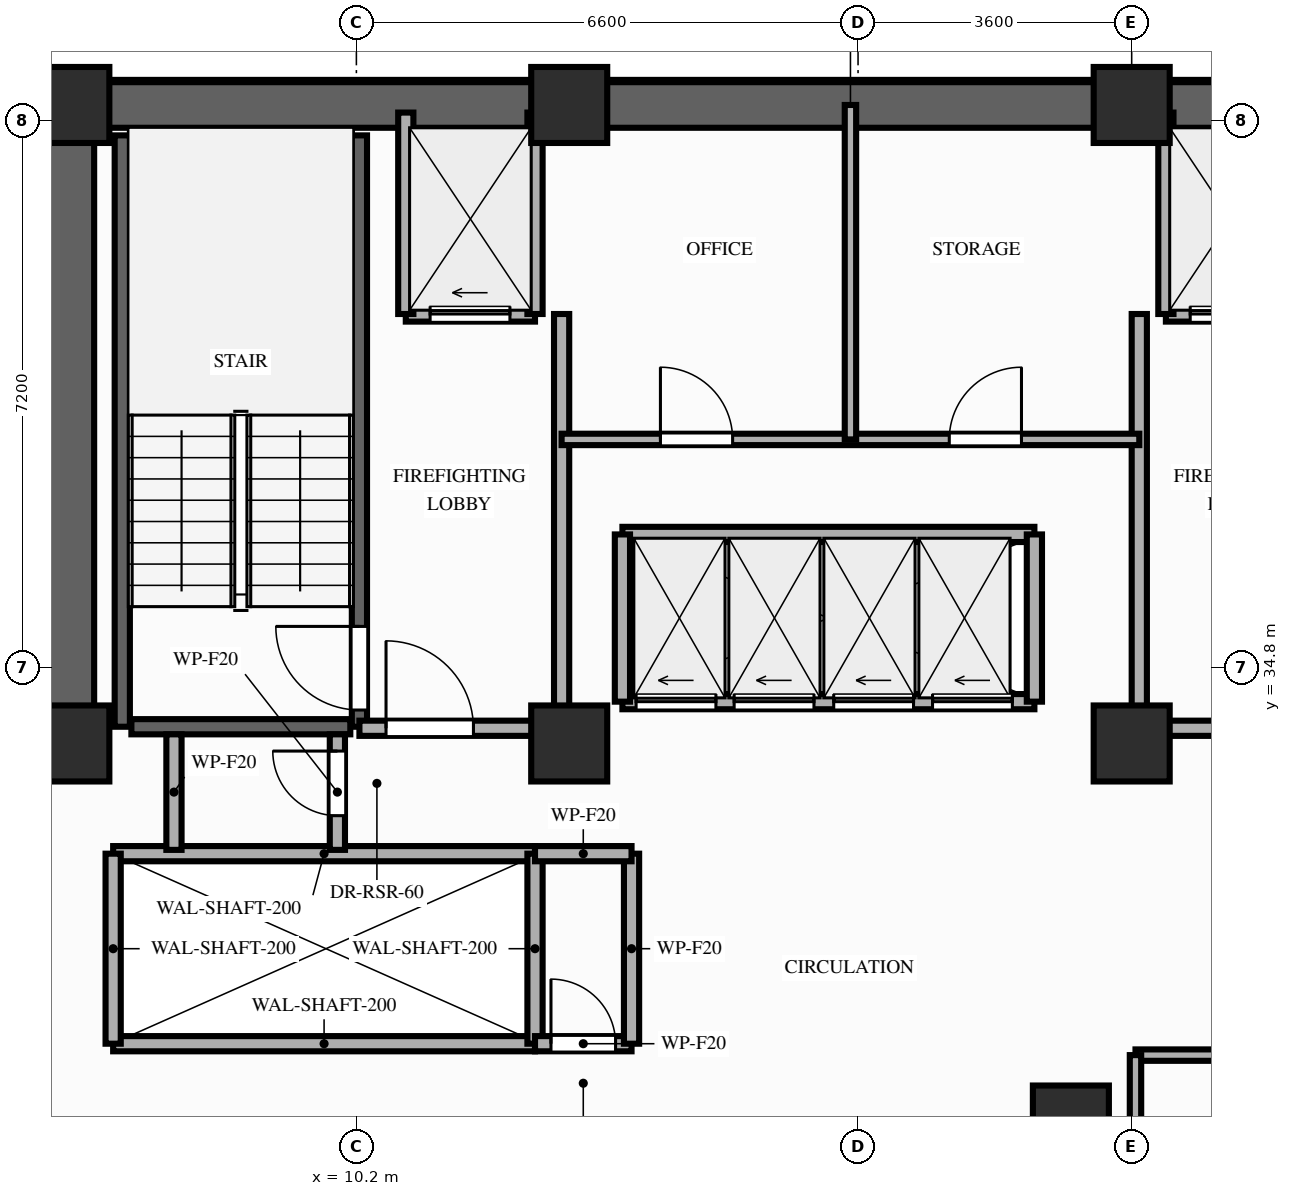
"""IFC4 building model, lengths in metres.
Left out: names, types, materials, properties, quantities, classifications, styles, units other than length and angle.
Written with IfcOpenShell. Run it as: python <this file> out.ifc"""

import sys

from ifc_helpers import new_model, si_unit, direction, frame, frame_2d, origin, origin_2d, place, context, subcontext, project, spatial, rectangle, extrude, element, fill, save


model = new_model("IFC4")
c1 = context("Model", 3, precision=1e-05, world=origin(), true_north=direction((0.0, 1.0)))
c2 = subcontext(c1, "Body", "Model", "MODEL_VIEW")
j1 = project(units=[si_unit("LENGTHUNIT", "METRE"), si_unit("PLANEANGLEUNIT", "RADIAN")], contexts=[c1])
p1 = place(None, origin())
s1 = spatial("IfcSite", under=j1, at=p1, CompositionType="ELEMENT")
p2 = place(p1, origin())
s2 = spatial("IfcBuilding", under=s1, at=p2, CompositionType="ELEMENT")
p3 = place(p2, frame((0.0, 0.0, 120.2)))
s3 = spatial("IfcBuildingStorey", under=s2, at=p3, CompositionType="ELEMENT", Elevation=120.2)
for number, where, z_axis, x_axis in (
    (1, (6.45, 33.8, 0.0), (0.0, 0.0, 1.0), (1.0, 0.0, 0.0)),
    (2, (13.0, 33.8, 0.0), (0.0, 0.0, 1.0), (1.0, 0.0, 0.0)),
    (3, (20.4, 33.8, 0.0), (0.0, 0.0, 1.0), (1.0, 0.0, 0.0)),
    (4, (6.45, 42.2, 0.0), (0.0, 0.0, 1.0), (1.0, 0.0, 0.0)),
    (5, (13.0, 42.2, 0.0), (0.0, 0.0, 1.0), (1.0, 0.0, 0.0)),
    (6, (20.4, 42.2, 0.0), (0.0, 0.0, 1.0), (1.0, 0.0, 0.0)),
    (7, (19.6, 28.8, 0.0), (0.0, 0.0, 1.0), (1.0, 0.0, 0.0)),
):
    element("IfcColumn", number, at=place(p3, frame(where, z_axis=z_axis, x_axis=x_axis)), inside=s3, PredefinedType="COLUMN", context=c2, shape_type="SweptSolid", body=[
        extrude(rectangle(XDim=1.0, YDim=1.0, at=origin_2d()), origin(), (0.0, 0.0, 1.0), 3.2),
    ])
p4 = place(p3, frame((6.45, 42.2, 0.0), z_axis=(0.0, 0.0, 1.0), x_axis=(1.0, 0.0, 0.0)))
e8 = element("IfcWall", 8, at=p4, inside=s3, PredefinedType="SHEAR", context=c2, shape_type="SweptSolid", body=[
    extrude(rectangle(XDim=20.45, YDim=0.6, at=frame_2d((10.225, 0.0))), origin(), (0.0, 0.0, 1.0), 3.02),
])
p5 = place(p3, frame((6.45, 33.8, 0.0), z_axis=(0.0, 0.0, 1.0), x_axis=(0.0, 1.0, 0.0)))
e9 = element("IfcWall", 9, at=p5, inside=s3, PredefinedType="SHEAR", context=c2, shape_type="SweptSolid", body=[
    extrude(rectangle(XDim=7.95, YDim=0.6, at=frame_2d((3.975, 0.0))), origin(), (0.0, 0.0, 1.0), 3.02),
])
p6 = place(p3, frame((7.12, 34.02, 0.0), z_axis=(0.0, 0.0, 1.0), x_axis=(0.0, 1.0, 0.0)))
e10 = element("IfcWall", 10, at=p6, inside=s3, PredefinedType="SHEAR", context=c2, shape_type="SweptSolid", body=[
    extrude(rectangle(XDim=7.78, YDim=0.2, at=frame_2d((3.89, 0.0))), origin(), (0.0, 0.0, 1.0), 3.02),
])
p7 = place(p3, frame((10.24, 34.02, 0.0), z_axis=(0.0, 0.0, 1.0), x_axis=(0.0, 1.0, 0.0)))
e11 = element("IfcWall", 11, at=p7, inside=s3, PredefinedType="SHEAR", context=c2, shape_type="SweptSolid", body=[
    extrude(rectangle(XDim=7.78, YDim=0.2, at=frame_2d((3.89, 0.0))), origin(), (0.0, 0.0, 1.0), 3.02),
])
p8 = place(p7, frame((0.22, 0.0, 0.0)))
e12 = element("IfcOpeningElement", 12, at=p8, cuts=e11, PredefinedType="OPENING", context=c2, shape_type="SweptSolid", body=[
    extrude(rectangle(XDim=1.1, YDim=2.15, at=frame_2d((0.55, 1.075))), frame((0.0, 0.11, 0.0), z_axis=(0.0, -1.0, 0.0), x_axis=(1.0, 0.0, 0.0)), (0.0, 0.0, 1.0), 0.22),
])
p9 = place(p3, frame((7.24, 34.02, 0.0), z_axis=(0.0, 0.0, 1.0), x_axis=(1.0, 0.0, 0.0)))
e13 = element("IfcWall", 13, at=p9, inside=s3, PredefinedType="SHEAR", context=c2, shape_type="SweptSolid", body=[
    extrude(rectangle(XDim=2.88, YDim=0.2, at=frame_2d((1.44, 0.0))), origin(), (0.0, 0.0, 1.0), 3.02),
])
for number, where, z_axis, x_axis in (
    (14, (7.0, 29.85, 0.0), (0.0, 0.0, 1.0), (1.0, 0.0, 0.0)),
    (15, (7.0, 32.35, 0.0), (0.0, 0.0, 1.0), (1.0, 0.0, 0.0)),
):
    element("IfcWall", number, at=place(p3, frame(where, z_axis=z_axis, x_axis=x_axis)), inside=s3, PredefinedType="MOVABLE", context=c2, shape_type="SweptSolid", body=[
        extrude(rectangle(XDim=5.55, YDim=0.2, at=frame_2d((2.775, 0.0))), origin(), (0.0, 0.0, 1.0), 3.02),
    ])
for number, where, z_axis, x_axis in (
    (16, (7.0, 29.85, 0.0), (0.0, 0.0, 1.0), (0.0, 1.0, 0.0)),
    (17, (12.55, 29.85, 0.0), (0.0, 0.0, 1.0), (0.0, 1.0, 0.0)),
):
    element("IfcWall", number, at=place(p3, frame(where, z_axis=z_axis, x_axis=x_axis)), inside=s3, PredefinedType="MOVABLE", context=c2, shape_type="SweptSolid", body=[
        extrude(rectangle(XDim=2.5, YDim=0.2, at=frame_2d((1.25, 0.0))), origin(), (0.0, 0.0, 1.0), 3.02),
    ])
p10 = place(p3, frame((10.85, 39.45, 0.0), z_axis=(0.0, 0.0, 1.0), x_axis=(1.0, 0.0, 0.0)))
e18 = element("IfcWall", 18, at=p10, inside=s3, PredefinedType="MOVABLE", context=c2, shape_type="SweptSolid", body=[
    extrude(rectangle(XDim=1.7, YDim=0.2, at=frame_2d((0.85, 0.0))), origin(), (0.0, 0.0, 1.0), 3.02),
])
p11 = place(p10, frame((0.32, 0.0, 0.0)))
e19 = element("IfcOpeningElement", 19, at=p11, cuts=e18, PredefinedType="OPENING", context=c2, shape_type="SweptSolid", body=[
    extrude(rectangle(XDim=1.05, YDim=2.15, at=frame_2d((0.525, 1.075))), frame((0.0, 0.11, 0.0), z_axis=(0.0, -1.0, 0.0), x_axis=(1.0, 0.0, 0.0)), (0.0, 0.0, 1.0), 0.22),
])
p12 = place(p3, frame((20.85, 39.45, 0.0), z_axis=(0.0, 0.0, 1.0), x_axis=(1.0, 0.0, 0.0)))
e20 = element("IfcWall", 20, at=p12, inside=s3, PredefinedType="MOVABLE", context=c2, shape_type="SweptSolid", body=[
    extrude(rectangle(XDim=1.7, YDim=0.2, at=frame_2d((0.85, 0.0))), origin(), (0.0, 0.0, 1.0), 3.02),
])
p13 = place(p12, frame((0.32, 0.0, 0.0)))
e21 = element("IfcOpeningElement", 21, at=p13, cuts=e20, PredefinedType="OPENING", context=c2, shape_type="SweptSolid", body=[
    extrude(rectangle(XDim=1.05, YDim=2.15, at=frame_2d((0.525, 1.075))), frame((0.0, 0.11, 0.0), z_axis=(0.0, -1.0, 0.0), x_axis=(1.0, 0.0, 0.0)), (0.0, 0.0, 1.0), 0.22),
])
for number, where, z_axis, x_axis in (
    (22, (10.85, 39.45, 0.0), (0.0, 0.0, 1.0), (0.0, 1.0, 0.0)),
    (23, (12.55, 39.45, 0.0), (0.0, 0.0, 1.0), (0.0, 1.0, 0.0)),
):
    element("IfcWall", number, at=place(p3, frame(where, z_axis=z_axis, x_axis=x_axis)), inside=s3, PredefinedType="MOVABLE", context=c2, shape_type="SweptSolid", body=[
        extrude(rectangle(XDim=2.65, YDim=0.2, at=frame_2d((1.325, 0.0))), origin(), (0.0, 0.0, 1.0), 2.41),
    ])
p14 = place(p3, frame((12.9, 34.0, 0.0), z_axis=(0.0, 0.0, 1.0), x_axis=(0.0, 1.0, 0.0)))
e24 = element("IfcWall", 24, at=p14, inside=s3, PredefinedType="PARTITIONING", context=c2, shape_type="SweptSolid", body=[
    extrude(rectangle(XDim=5.45, YDim=0.2, at=frame_2d((2.725, 0.0))), origin(), (0.0, 0.0, 1.0), 2.41),
])
p15 = place(p3, frame((10.24, 34.0, 0.0), z_axis=(0.0, 0.0, 1.0), x_axis=(1.0, 0.0, 0.0)))
e25 = element("IfcWall", 25, at=p15, inside=s3, PredefinedType="PARTITIONING", context=c2, shape_type="SweptSolid", body=[
    extrude(rectangle(XDim=2.66, YDim=0.2, at=frame_2d((1.33, 0.0))), origin(), (0.0, 0.0, 1.0), 2.41),
])
p16 = place(p15, frame((0.35, 0.0, 0.0)))
e26 = element("IfcOpeningElement", 26, at=p16, cuts=e25, PredefinedType="OPENING", context=c2, shape_type="SweptSolid", body=[
    extrude(rectangle(XDim=1.15, YDim=2.15, at=frame_2d((0.575, 1.075))), frame((0.0, 0.11, 0.0), z_axis=(0.0, -1.0, 0.0), x_axis=(1.0, 0.0, 0.0)), (0.0, 0.0, 1.0), 0.22),
])
p17 = place(p3, frame((20.85, 39.45, 0.0), z_axis=(0.0, 0.0, 1.0), x_axis=(0.0, 1.0, 0.0)))
e27 = element("IfcWall", 27, at=p17, inside=s3, PredefinedType="MOVABLE", context=c2, shape_type="SweptSolid", body=[
    extrude(rectangle(XDim=2.65, YDim=0.2, at=frame_2d((1.325, 0.0))), origin(), (0.0, 0.0, 1.0), 2.41),
])
p18 = place(p3, frame((20.5, 34.0, 0.0), z_axis=(0.0, 0.0, 1.0), x_axis=(0.0, 1.0, 0.0)))
e28 = element("IfcWall", 28, at=p18, inside=s3, PredefinedType="PARTITIONING", context=c2, shape_type="SweptSolid", body=[
    extrude(rectangle(XDim=5.45, YDim=0.2, at=frame_2d((2.725, 0.0))), origin(), (0.0, 0.0, 1.0), 2.41),
])
p19 = place(p3, frame((20.5, 34.0, 0.0), z_axis=(0.0, 0.0, 1.0), x_axis=(1.0, 0.0, 0.0)))
e29 = element("IfcWall", 29, at=p19, inside=s3, PredefinedType="PARTITIONING", context=c2, shape_type="SweptSolid", body=[
    extrude(rectangle(XDim=2.6, YDim=0.2, at=frame_2d((1.3, 0.0))), origin(), (0.0, 0.0, 1.0), 2.41),
])
p20 = place(p19, frame((1.05, 0.0, 0.0)))
e30 = element("IfcOpeningElement", 30, at=p20, cuts=e29, PredefinedType="OPENING", context=c2, shape_type="SweptSolid", body=[
    extrude(rectangle(XDim=1.15, YDim=2.15, at=frame_2d((0.575, 1.075))), frame((0.0, 0.11, 0.0), z_axis=(0.0, -1.0, 0.0), x_axis=(1.0, 0.0, 0.0)), (0.0, 0.0, 1.0), 0.22),
])
p21 = place(p3, frame((12.55, 29.85, 0.0), z_axis=(0.0, 0.0, 1.0), x_axis=(1.0, 0.0, 0.0)))
e31 = element("IfcWall", 31, at=p21, inside=s3, PredefinedType="PARTITIONING", context=c2, shape_type="SweptSolid", body=[
    extrude(rectangle(XDim=1.27, YDim=0.2, at=frame_2d((0.635, 0.0))), origin(), (0.0, 0.0, 1.0), 3.02),
])
p22 = place(p21, frame((0.21, 0.0, 0.0)))
e32 = element("IfcOpeningElement", 32, at=p22, cuts=e31, PredefinedType="OPENING", context=c2, shape_type="SweptSolid", body=[
    extrude(rectangle(XDim=0.85, YDim=2.05, at=frame_2d((0.425, 1.025))), frame((0.0, 0.11, 0.0), z_axis=(0.0, -1.0, 0.0), x_axis=(1.0, 0.0, 0.0)), (0.0, 0.0, 1.0), 0.22),
])
p23 = place(p3, frame((13.82, 29.85, 0.0), z_axis=(0.0, 0.0, 1.0), x_axis=(0.0, 1.0, 0.0)))
e33 = element("IfcWall", 33, at=p23, inside=s3, PredefinedType="PARTITIONING", context=c2, shape_type="SweptSolid", body=[
    extrude(rectangle(XDim=2.5, YDim=0.2, at=frame_2d((1.25, 0.0))), origin(), (0.0, 0.0, 1.0), 3.02),
])
p24 = place(p3, frame((12.55, 32.35, 0.0), z_axis=(0.0, 0.0, 1.0), x_axis=(1.0, 0.0, 0.0)))
e34 = element("IfcWall", 34, at=p24, inside=s3, PredefinedType="PARTITIONING", context=c2, shape_type="SweptSolid", body=[
    extrude(rectangle(XDim=1.27, YDim=0.2, at=frame_2d((0.635, 0.0))), origin(), (0.0, 0.0, 1.0), 3.02),
])
p25 = place(p3, frame((7.8, 32.4, 0.0), z_axis=(0.0, 0.0, 1.0), x_axis=(0.0, 1.0, 0.0)))
e35 = element("IfcWall", 35, at=p25, inside=s3, PredefinedType="PARTITIONING", context=c2, shape_type="SweptSolid", body=[
    extrude(rectangle(XDim=1.52, YDim=0.2, at=frame_2d((0.76, 0.0))), origin(), (0.0, 0.0, 1.0), 2.41),
])
p26 = place(p3, frame((9.95, 32.4, 0.0), z_axis=(0.0, 0.0, 1.0), x_axis=(0.0, 1.0, 0.0)))
e36 = element("IfcWall", 36, at=p26, inside=s3, PredefinedType="PARTITIONING", context=c2, shape_type="SweptSolid", body=[
    extrude(rectangle(XDim=1.52, YDim=0.2, at=frame_2d((0.76, 0.0))), origin(), (0.0, 0.0, 1.0), 2.41),
])
p27 = place(p26, frame((0.45, 0.0, 0.0)))
e37 = element("IfcOpeningElement", 37, at=p27, cuts=e36, PredefinedType="OPENING", context=c2, shape_type="SweptSolid", body=[
    extrude(rectangle(XDim=0.85, YDim=2.05, at=frame_2d((0.425, 1.025))), frame((0.0, 0.11, 0.0), z_axis=(0.0, -1.0, 0.0), x_axis=(1.0, 0.0, 0.0)), (0.0, 0.0, 1.0), 0.22),
])
p28 = place(p3, frame((12.9, 37.8, 0.0), z_axis=(0.0, 0.0, 1.0), x_axis=(1.0, 0.0, 0.0)))
e38 = element("IfcWall", 38, at=p28, inside=s3, PredefinedType="PARTITIONING", context=c2, shape_type="SweptSolid", body=[
    extrude(rectangle(XDim=7.6, YDim=0.15, at=frame_2d((3.8, 0.0))), origin(), (0.0, 0.0, 1.0), 3.02),
])
p29 = place(p28, frame((1.3, 0.0, 0.0)))
e39 = element("IfcOpeningElement", 39, at=p29, cuts=e38, PredefinedType="OPENING", context=c2, shape_type="SweptSolid", body=[
    extrude(rectangle(XDim=0.95, YDim=2.15, at=frame_2d((0.475, 1.075))), frame((0.0, 0.085, 0.0), z_axis=(0.0, -1.0, 0.0), x_axis=(1.0, 0.0, 0.0)), (0.0, 0.0, 1.0), 0.17),
])
p30 = place(p28, frame((5.1, 0.0, 0.0)))
e40 = element("IfcOpeningElement", 40, at=p30, cuts=e38, PredefinedType="OPENING", context=c2, shape_type="SweptSolid", body=[
    extrude(rectangle(XDim=0.95, YDim=2.15, at=frame_2d((0.475, 1.075))), frame((0.0, 0.085, 0.0), z_axis=(0.0, -1.0, 0.0), x_axis=(1.0, 0.0, 0.0)), (0.0, 0.0, 1.0), 0.17),
])
p31 = place(p3, frame((16.7, 37.8, 0.0), z_axis=(0.0, 0.0, 1.0), x_axis=(0.0, 1.0, 0.0)))
e41 = element("IfcWall", 41, at=p31, inside=s3, PredefinedType="PARTITIONING", context=c2, shape_type="SweptSolid", body=[
    extrude(rectangle(XDim=4.4, YDim=0.15, at=frame_2d((2.2, 0.0))), origin(), (0.0, 0.0, 1.0), 2.41),
])
p32 = place(p3, frame((13.7, 34.35, 0.0), z_axis=(0.0, 0.0, 1.0), x_axis=(1.0, 0.0, 0.0)))
e42 = element("IfcWall", 42, at=p32, inside=s3, PredefinedType="MOVABLE", context=c2, shape_type="SweptSolid", body=[
    extrude(rectangle(XDim=5.42, YDim=0.2, at=frame_2d((2.71, 0.0))), origin(), (0.0, 0.0, 1.0), 3.02),
])
p33 = place(p32, frame((0.18, 0.0, 0.0)))
e43 = element("IfcOpeningElement", 43, at=p33, cuts=e42, PredefinedType="OPENING", context=c2, shape_type="SweptSolid", body=[
    extrude(rectangle(XDim=1.05, YDim=2.15, at=frame_2d((0.525, 1.075))), frame((0.0, 0.11, 0.0), z_axis=(0.0, -1.0, 0.0), x_axis=(1.0, 0.0, 0.0)), (0.0, 0.0, 1.0), 0.22),
])
p34 = place(p32, frame((1.47, 0.0, 0.0)))
e44 = element("IfcOpeningElement", 44, at=p34, cuts=e42, PredefinedType="OPENING", context=c2, shape_type="SweptSolid", body=[
    extrude(rectangle(XDim=1.05, YDim=2.15, at=frame_2d((0.525, 1.075))), frame((0.0, 0.11, 0.0), z_axis=(0.0, -1.0, 0.0), x_axis=(1.0, 0.0, 0.0)), (0.0, 0.0, 1.0), 0.22),
])
p35 = place(p32, frame((2.78, 0.0, 0.0)))
e45 = element("IfcOpeningElement", 45, at=p35, cuts=e42, PredefinedType="OPENING", context=c2, shape_type="SweptSolid", body=[
    extrude(rectangle(XDim=1.05, YDim=2.15, at=frame_2d((0.525, 1.075))), frame((0.0, 0.11, 0.0), z_axis=(0.0, -1.0, 0.0), x_axis=(1.0, 0.0, 0.0)), (0.0, 0.0, 1.0), 0.22),
])
p36 = place(p32, frame((4.08, 0.0, 0.0)))
e46 = element("IfcOpeningElement", 46, at=p36, cuts=e42, PredefinedType="OPENING", context=c2, shape_type="SweptSolid", body=[
    extrude(rectangle(XDim=1.05, YDim=2.15, at=frame_2d((0.525, 1.075))), frame((0.0, 0.11, 0.0), z_axis=(0.0, -1.0, 0.0), x_axis=(1.0, 0.0, 0.0)), (0.0, 0.0, 1.0), 0.22),
])
p37 = place(p3, frame((13.7, 36.55, 0.0), z_axis=(0.0, 0.0, 1.0), x_axis=(1.0, 0.0, 0.0)))
e47 = element("IfcWall", 47, at=p37, inside=s3, PredefinedType="MOVABLE", context=c2, shape_type="SweptSolid", body=[
    extrude(rectangle(XDim=5.42, YDim=0.2, at=frame_2d((2.71, 0.0))), origin(), (0.0, 0.0, 1.0), 3.02),
])
for number, where, z_axis, x_axis in (
    (48, (13.7, 34.35, 0.0), (0.0, 0.0, 1.0), (0.0, 1.0, 0.0)),
    (49, (19.12, 34.35, 0.0), (0.0, 0.0, 1.0), (0.0, 1.0, 0.0)),
):
    element("IfcWall", number, at=place(p3, frame(where, z_axis=z_axis, x_axis=x_axis)), inside=s3, PredefinedType="MOVABLE", context=c2, shape_type="SweptSolid", body=[
        extrude(rectangle(XDim=2.2, YDim=0.2, at=frame_2d((1.1, 0.0))), origin(), (0.0, 0.0, 1.0), 3.02),
    ])
p38 = place(p3, frame((20.45, 29.7, 0.0), z_axis=(0.0, 0.0, 1.0), x_axis=(1.0, 0.0, 0.0)))
e50 = element("IfcWall", 50, at=p38, inside=s3, PredefinedType="PARTITIONING", context=c2, shape_type="SweptSolid", body=[
    extrude(rectangle(XDim=6.7, YDim=0.15, at=frame_2d((3.35, 0.0))), origin(), (0.0, 0.0, 1.0), 3.02),
])
p39 = place(p38, frame((2.8, 0.0, 0.0)))
e51 = element("IfcOpeningElement", 51, at=p39, cuts=e50, PredefinedType="OPENING", context=c2, shape_type="SweptSolid", body=[
    extrude(rectangle(XDim=0.95, YDim=2.15, at=frame_2d((0.475, 1.075))), frame((0.0, 0.085, 0.0), z_axis=(0.0, -1.0, 0.0), x_axis=(1.0, 0.0, 0.0)), (0.0, 0.0, 1.0), 0.17),
])
p40 = place(p3, frame((20.45, 26.75, 0.0), z_axis=(0.0, 0.0, 1.0), x_axis=(0.0, 1.0, 0.0)))
e52 = element("IfcWall", 52, at=p40, inside=s3, PredefinedType="PARTITIONING", context=c2, shape_type="SweptSolid", body=[
    extrude(rectangle(XDim=2.95, YDim=0.15, at=frame_2d((1.475, 0.0))), origin(), (0.0, 0.0, 1.0), 2.41),
])
p41 = place(p8, origin())
e53 = element("IfcDoor", 53, at=p41, inside=s3, OperationType="SINGLE_SWING_RIGHT", PredefinedType="DOOR", context=c2, shape_type="SweptSolid", body=[
    extrude(rectangle(XDim=1.1, YDim=2.15, at=frame_2d((0.55, 1.075))), frame((0.0, 0.025, 0.0), z_axis=(0.0, -1.0, 0.0), x_axis=(1.0, 0.0, 0.0)), (0.0, 0.0, 1.0), 0.05),
])
fill(e12, e53)
p42 = place(p11, origin())
e54 = element("IfcDoor", 54, at=p42, inside=s3, OperationType="SLIDING_TO_LEFT", PredefinedType="DOOR", context=c2, shape_type="SweptSolid", body=[
    extrude(rectangle(XDim=1.05, YDim=2.15, at=frame_2d((0.525, 1.075))), frame((0.0, 0.025, 0.0), z_axis=(0.0, -1.0, 0.0), x_axis=(1.0, 0.0, 0.0)), (0.0, 0.0, 1.0), 0.05),
])
fill(e19, e54)
p43 = place(p13, origin())
e55 = element("IfcDoor", 55, at=p43, inside=s3, OperationType="SLIDING_TO_LEFT", PredefinedType="DOOR", context=c2, shape_type="SweptSolid", body=[
    extrude(rectangle(XDim=1.05, YDim=2.15, at=frame_2d((0.525, 1.075))), frame((0.0, 0.025, 0.0), z_axis=(0.0, -1.0, 0.0), x_axis=(1.0, 0.0, 0.0)), (0.0, 0.0, 1.0), 0.05),
])
fill(e21, e55)
p44 = place(p16, origin())
e56 = element("IfcDoor", 56, at=p44, inside=s3, OperationType="SINGLE_SWING_LEFT", PredefinedType="DOOR", context=c2, shape_type="SweptSolid", body=[
    extrude(rectangle(XDim=1.15, YDim=2.15, at=frame_2d((0.575, 1.075))), frame((0.0, 0.025, 0.0), z_axis=(0.0, -1.0, 0.0), x_axis=(1.0, 0.0, 0.0)), (0.0, 0.0, 1.0), 0.05),
])
fill(e26, e56)
p45 = place(p22, origin())
e57 = element("IfcDoor", 57, at=p45, inside=s3, OperationType="SINGLE_SWING_LEFT", PredefinedType="DOOR", context=c2, shape_type="SweptSolid", body=[
    extrude(rectangle(XDim=0.85, YDim=2.05, at=frame_2d((0.425, 1.025))), frame((0.0, 0.025, 0.0), z_axis=(0.0, -1.0, 0.0), x_axis=(1.0, 0.0, 0.0)), (0.0, 0.0, 1.0), 0.05),
])
fill(e32, e57)
p46 = place(p27, origin())
e58 = element("IfcDoor", 58, at=p46, inside=s3, OperationType="SINGLE_SWING_RIGHT", PredefinedType="DOOR", context=c2, shape_type="SweptSolid", body=[
    extrude(rectangle(XDim=0.85, YDim=2.05, at=frame_2d((0.425, 1.025))), frame((0.0, 0.025, 0.0), z_axis=(0.0, -1.0, 0.0), x_axis=(1.0, 0.0, 0.0)), (0.0, 0.0, 1.0), 0.05),
])
fill(e37, e58)
p47 = place(p29, origin())
e59 = element("IfcDoor", 59, at=p47, inside=s3, OperationType="SINGLE_SWING_LEFT", PredefinedType="DOOR", context=c2, shape_type="SweptSolid", body=[
    extrude(rectangle(XDim=0.95, YDim=2.15, at=frame_2d((0.475, 1.075))), frame((0.0, 0.025, 0.0), z_axis=(0.0, -1.0, 0.0), x_axis=(1.0, 0.0, 0.0)), (0.0, 0.0, 1.0), 0.05),
])
fill(e39, e59)
p48 = place(p30, origin())
e60 = element("IfcDoor", 60, at=p48, inside=s3, OperationType="SINGLE_SWING_RIGHT", PredefinedType="DOOR", context=c2, shape_type="SweptSolid", body=[
    extrude(rectangle(XDim=0.95, YDim=2.15, at=frame_2d((0.475, 1.075))), frame((0.0, 0.025, 0.0), z_axis=(0.0, -1.0, 0.0), x_axis=(1.0, 0.0, 0.0)), (0.0, 0.0, 1.0), 0.05),
])
fill(e40, e60)
p49 = place(p33, origin())
e61 = element("IfcDoor", 61, at=p49, inside=s3, OperationType="SLIDING_TO_LEFT", PredefinedType="DOOR", context=c2, shape_type="SweptSolid", body=[
    extrude(rectangle(XDim=1.05, YDim=2.15, at=frame_2d((0.525, 1.075))), frame((0.0, 0.025, 0.0), z_axis=(0.0, -1.0, 0.0), x_axis=(1.0, 0.0, 0.0)), (0.0, 0.0, 1.0), 0.05),
])
fill(e43, e61)
p50 = place(p34, origin())
e62 = element("IfcDoor", 62, at=p50, inside=s3, OperationType="SLIDING_TO_LEFT", PredefinedType="DOOR", context=c2, shape_type="SweptSolid", body=[
    extrude(rectangle(XDim=1.05, YDim=2.15, at=frame_2d((0.525, 1.075))), frame((0.0, 0.025, 0.0), z_axis=(0.0, -1.0, 0.0), x_axis=(1.0, 0.0, 0.0)), (0.0, 0.0, 1.0), 0.05),
])
fill(e44, e62)
p51 = place(p35, origin())
e63 = element("IfcDoor", 63, at=p51, inside=s3, OperationType="SLIDING_TO_LEFT", PredefinedType="DOOR", context=c2, shape_type="SweptSolid", body=[
    extrude(rectangle(XDim=1.05, YDim=2.15, at=frame_2d((0.525, 1.075))), frame((0.0, 0.025, 0.0), z_axis=(0.0, -1.0, 0.0), x_axis=(1.0, 0.0, 0.0)), (0.0, 0.0, 1.0), 0.05),
])
fill(e45, e63)
p52 = place(p36, origin())
e64 = element("IfcDoor", 64, at=p52, inside=s3, OperationType="SLIDING_TO_LEFT", PredefinedType="DOOR", context=c2, shape_type="SweptSolid", body=[
    extrude(rectangle(XDim=1.05, YDim=2.15, at=frame_2d((0.525, 1.075))), frame((0.0, 0.025, 0.0), z_axis=(0.0, -1.0, 0.0), x_axis=(1.0, 0.0, 0.0)), (0.0, 0.0, 1.0), 0.05),
])
fill(e46, e64)
save(model, sys.argv[1])
